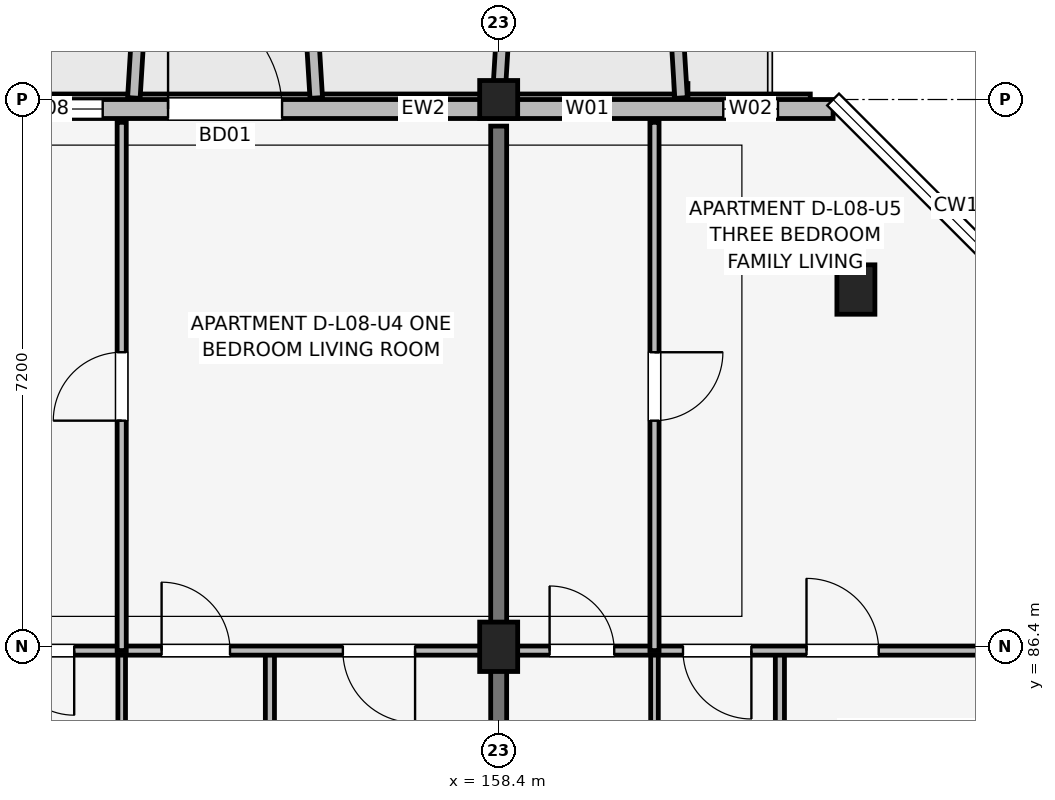
"""IFC4 building model, lengths in metres.
Left out: names, types, materials, properties, quantities, classifications, styles, units other than length and angle.
Written with IfcOpenShell. Run it as: python <this file> out.ifc"""

import sys

from ifc_helpers import new_model, si_unit, direction, frame, frame_2d, origin, origin_2d, place, context, subcontext, project, spatial, rectangle, extrude, element, fill, save


model = new_model("IFC4")
c1 = context("Model", 3, precision=1e-05, world=origin(), true_north=direction((0.0, 1.0)))
c2 = subcontext(c1, "Body", "Model", "MODEL_VIEW")
j1 = project(units=[si_unit("LENGTHUNIT", "METRE"), si_unit("PLANEANGLEUNIT", "RADIAN")], contexts=[c1])
p1 = place(None, origin())
s1 = spatial("IfcSite", under=j1, at=p1, CompositionType="ELEMENT")
p2 = place(p1, origin())
s2 = spatial("IfcBuilding", under=s1, at=p2, CompositionType="ELEMENT")
p3 = place(p2, frame((0.0, 0.0, 27.6)))
s3 = spatial("IfcBuildingStorey", under=s2, at=p3, CompositionType="ELEMENT", Elevation=27.6)
p4 = place(p3, frame((158.4, 86.4, 0.0), z_axis=(0.0, 0.0, 1.0), x_axis=(1.0, 0.0, 0.0)))
e1 = element("IfcColumn", 1, at=p4, inside=s3, PredefinedType="COLUMN", context=c2, shape_type="SweptSolid", body=[
    extrude(rectangle(XDim=0.5, YDim=0.65, at=origin_2d()), origin(), (0.0, 0.0, 1.0), 3.15),
])
p5 = place(p3, frame((158.4, 93.6, 0.0), z_axis=(0.0, 0.0, 1.0), x_axis=(1.0, 0.0, 0.0)))
e2 = element("IfcColumn", 2, at=p5, inside=s3, PredefinedType="COLUMN", context=c2, shape_type="SweptSolid", body=[
    extrude(rectangle(XDim=0.5, YDim=0.5, at=origin_2d()), origin(), (0.0, 0.0, 1.0), 3.15),
])
p6 = place(p3, frame((163.1, 91.1, 0.0), z_axis=(0.0, 0.0, 1.0), x_axis=(1.0, 0.0, 0.0)))
e3 = element("IfcColumn", 3, at=p6, inside=s3, PredefinedType="COLUMN", context=c2, shape_type="SweptSolid", body=[
    extrude(rectangle(XDim=0.5, YDim=0.65, at=origin_2d()), origin(), (0.0, 0.0, 1.0), 3.15),
])
p7 = place(p3, frame((158.4, 83.85, 0.0), z_axis=(0.0, 0.0, 1.0), x_axis=(0.0, 1.0, 0.0)))
e4 = element("IfcWall", 4, at=p7, inside=s3, PredefinedType="SHEAR", context=c2, shape_type="SweptSolid", body=[
    extrude(rectangle(XDim=9.4, YDim=0.21, at=frame_2d((4.7, 0.0))), origin(), (0.0, 0.0, 1.0), 3.15),
])
p8 = place(p3, frame((162.8, 93.475, 0.0), z_axis=(0.0, 0.0, 1.0), x_axis=(-1.0, 0.0, 0.0)))
e5 = element("IfcWall", 5, at=p8, inside=s3, PredefinedType="SOLIDWALL", context=c2, shape_type="SweptSolid", body=[
    extrude(rectangle(XDim=30.4, YDim=0.25, at=frame_2d((15.2, 0.0))), origin(), (0.0, 0.0, 1.0), 2.43),
])
p9 = place(p8, frame((23.225, 0.0, 0.0), z_axis=(0.0, 0.0, 1.0), x_axis=(-1.0, 0.0, 0.0)))
e6 = element("IfcOpeningElement", 6, at=p9, cuts=e5, PredefinedType="OPENING", context=c2, shape_type="SweptSolid", body=[
    extrude(rectangle(XDim=1.65, YDim=2.15, at=frame_2d((0.825, 1.075))), frame((0.0, 0.135, 0.0), z_axis=(0.0, -1.0, 0.0), x_axis=(1.0, 0.0, 0.0)), (0.0, 0.0, 1.0), 0.27),
])
p10 = place(p8, frame((8.75, 0.0, 0.0), z_axis=(0.0, 0.0, 1.0), x_axis=(-1.0, 0.0, 0.0)))
e7 = element("IfcOpeningElement", 7, at=p10, cuts=e5, PredefinedType="OPENING", context=c2, shape_type="SweptSolid", body=[
    extrude(rectangle(XDim=1.5, YDim=2.15, at=frame_2d((0.75, 1.075))), frame((0.0, 0.135, 0.0), z_axis=(0.0, -1.0, 0.0), x_axis=(1.0, 0.0, 0.0)), (0.0, 0.0, 1.0), 0.27),
])
p11 = place(p8, frame((26.545, 0.0, 0.75)))
e8 = element("IfcOpeningElement", 8, at=p11, cuts=e5, PredefinedType="OPENING", context=c2, shape_type="SweptSolid", body=[
    extrude(rectangle(XDim=0.98, YDim=1.45, at=frame_2d((0.49, 0.725))), frame((0.0, 0.135, 0.0), z_axis=(0.0, -1.0, 0.0), x_axis=(1.0, 0.0, 0.0)), (0.0, 0.0, 1.0), 0.27),
])
p12 = place(p8, frame((24.315, 0.0, 0.75)))
e9 = element("IfcOpeningElement", 9, at=p12, cuts=e5, PredefinedType="OPENING", context=c2, shape_type="SweptSolid", body=[
    extrude(rectangle(XDim=1.1, YDim=1.5, at=frame_2d((0.55, 0.75))), frame((0.0, 0.135, 0.0), z_axis=(0.0, -1.0, 0.0), x_axis=(1.0, 0.0, 0.0)), (0.0, 0.0, 1.0), 0.27),
])
p13 = place(p8, frame((16.525, 0.0, 0.7)))
e10 = element("IfcOpeningElement", 10, at=p13, cuts=e5, PredefinedType="OPENING", context=c2, shape_type="SweptSolid", body=[
    extrude(rectangle(XDim=1.86, YDim=1.6, at=frame_2d((0.93, 0.8))), frame((0.0, 0.135, 0.0), z_axis=(0.0, -1.0, 0.0), x_axis=(1.0, 0.0, 0.0)), (0.0, 0.0, 1.0), 0.27),
])
p14 = place(p8, frame((12.275, 0.0, 0.75)))
e11 = element("IfcOpeningElement", 11, at=p14, cuts=e5, PredefinedType="OPENING", context=c2, shape_type="SweptSolid", body=[
    extrude(rectangle(XDim=1.34, YDim=1.55, at=frame_2d((0.67, 0.775))), frame((0.0, 0.135, 0.0), z_axis=(0.0, -1.0, 0.0), x_axis=(1.0, 0.0, 0.0)), (0.0, 0.0, 1.0), 0.27),
])
p15 = place(p8, frame((9.61, 0.0, 0.75)))
e12 = element("IfcOpeningElement", 12, at=p15, cuts=e5, PredefinedType="OPENING", context=c2, shape_type="SweptSolid", body=[
    extrude(rectangle(XDim=1.46, YDim=1.55, at=frame_2d((0.73, 0.775))), frame((0.0, 0.135, 0.0), z_axis=(0.0, -1.0, 0.0), x_axis=(1.0, 0.0, 0.0)), (0.0, 0.0, 1.0), 0.27),
])
p16 = place(p8, frame((2.935, 0.0, 0.75)))
e13 = element("IfcOpeningElement", 13, at=p16, cuts=e5, PredefinedType="OPENING", context=c2, shape_type="SweptSolid", body=[
    extrude(rectangle(XDim=0.6, YDim=1.25, at=frame_2d((0.3, 0.625))), frame((0.0, 0.135, 0.0), z_axis=(0.0, -1.0, 0.0), x_axis=(1.0, 0.0, 0.0)), (0.0, 0.0, 1.0), 0.27),
])
p17 = place(p8, frame((0.725, 0.0, 0.75)))
e14 = element("IfcOpeningElement", 14, at=p17, cuts=e5, PredefinedType="OPENING", context=c2, shape_type="SweptSolid", body=[
    extrude(rectangle(XDim=0.72, YDim=1.35, at=frame_2d((0.36, 0.675))), frame((0.0, 0.135, 0.0), z_axis=(0.0, -1.0, 0.0), x_axis=(1.0, 0.0, 0.0)), (0.0, 0.0, 1.0), 0.27),
])
for number, where, z_axis, x_axis in (
    (15, (153.6, 93.62, 0.0), (0.0, 0.0, 1.0), (0.061, 0.998, 0.0)),
    (16, (156.0, 93.62, 0.0), (0.0, 0.0, 1.0), (-0.061, 0.998, 0.0)),
):
    element("IfcWall", number, at=place(p3, frame(where, z_axis=z_axis, x_axis=x_axis)), inside=s3, PredefinedType="ELEMENTEDWALL", context=c2, shape_type="SweptSolid", body=[
        extrude(rectangle(XDim=1.964, YDim=0.165, at=frame_2d((0.982, 0.0))), origin(), (0.0, 0.0, 1.0), 2.55),
    ])
for number, where, z_axis, x_axis in (
    (17, (158.4, 93.62, 0.0), (0.0, 0.0, 1.0), (0.061, 0.998, 0.0)),
    (18, (160.8, 93.62, 0.0), (0.0, 0.0, 1.0), (-0.061, 0.998, 0.0)),
):
    element("IfcWall", number, at=place(p3, frame(where, z_axis=z_axis, x_axis=x_axis)), inside=s3, PredefinedType="ELEMENTEDWALL", context=c2, shape_type="SweptSolid", body=[
        extrude(rectangle(XDim=1.964, YDim=0.165, at=frame_2d((0.982, 0.0))), origin(), (0.0, 0.0, 1.0), 2.95),
    ])
p18 = place(p3, frame((153.44, 83.7, 0.0), z_axis=(0.0, 0.0, 1.0), x_axis=(0.0, 1.0, 0.0)))
e19 = element("IfcWall", 19, at=p18, inside=s3, PredefinedType="PARTITIONING", context=c2, shape_type="SweptSolid", body=[
    extrude(rectangle(XDim=2.65, YDim=0.1, at=frame_2d((1.325, 0.0))), origin(), (0.0, 0.0, 1.0), 2.38),
])
p19 = place(p3, frame((155.39, 83.7, 0.0), z_axis=(0.0, 0.0, 1.0), x_axis=(0.0, 1.0, 0.0)))
e20 = element("IfcWall", 20, at=p19, inside=s3, PredefinedType="PARTITIONING", context=c2, shape_type="SweptSolid", body=[
    extrude(rectangle(XDim=2.65, YDim=0.12, at=frame_2d((1.325, 0.0))), origin(), (0.0, 0.0, 1.0), 2.38),
])
p20 = place(p3, frame((151.34, 86.35, 0.0), z_axis=(0.0, 0.0, 1.0), x_axis=(1.0, 0.0, 0.0)))
e21 = element("IfcWall", 21, at=p20, inside=s3, PredefinedType="PARTITIONING", context=c2, shape_type="SweptSolid", body=[
    extrude(rectangle(XDim=6.92, YDim=0.12, at=frame_2d((3.46, 0.0))), origin(), (0.0, 0.0, 1.0), 2.38),
])
p21 = place(p20, frame((1.475, 0.0, 0.0), z_axis=(0.0, 0.0, 1.0), x_axis=(-1.0, 0.0, 0.0)))
e22 = element("IfcOpeningElement", 22, at=p21, cuts=e21, PredefinedType="OPENING", context=c2, shape_type="SweptSolid", body=[
    extrude(rectangle(XDim=0.85, YDim=2.08, at=frame_2d((0.425, 1.04))), frame((0.0, 0.07, 0.0), z_axis=(0.0, -1.0, 0.0), x_axis=(1.0, 0.0, 0.0)), (0.0, 0.0, 1.0), 0.14),
])
p22 = place(p20, frame((2.625, 0.0, 0.0)))
e23 = element("IfcOpeningElement", 23, at=p22, cuts=e21, PredefinedType="OPENING", context=c2, shape_type="SweptSolid", body=[
    extrude(rectangle(XDim=0.9, YDim=2.08, at=frame_2d((0.45, 1.04))), frame((0.0, 0.07, 0.0), z_axis=(0.0, -1.0, 0.0), x_axis=(1.0, 0.0, 0.0)), (0.0, 0.0, 1.0), 0.14),
])
p23 = place(p20, frame((5.96, 0.0, 0.0), z_axis=(0.0, 0.0, 1.0), x_axis=(-1.0, 0.0, 0.0)))
e24 = element("IfcOpeningElement", 24, at=p23, cuts=e21, PredefinedType="OPENING", context=c2, shape_type="SweptSolid", body=[
    extrude(rectangle(XDim=0.95, YDim=2.08, at=frame_2d((0.475, 1.04))), frame((0.0, 0.07, 0.0), z_axis=(0.0, -1.0, 0.0), x_axis=(1.0, 0.0, 0.0)), (0.0, 0.0, 1.0), 0.14),
])
p24 = place(p3, frame((153.44, 86.35, 0.0), z_axis=(0.0, 0.0, 1.0), x_axis=(0.0, 1.0, 0.0)))
e25 = element("IfcWall", 25, at=p24, inside=s3, PredefinedType="PARTITIONING", context=c2, shape_type="SweptSolid", body=[
    extrude(rectangle(XDim=6.95, YDim=0.12, at=frame_2d((3.475, 0.0))), origin(), (0.0, 0.0, 1.0), 2.38),
])
p25 = place(p24, frame((3.025, 0.0, 0.0)))
e26 = element("IfcOpeningElement", 26, at=p25, cuts=e25, PredefinedType="OPENING", context=c2, shape_type="SweptSolid", body=[
    extrude(rectangle(XDim=0.9, YDim=2.08, at=frame_2d((0.45, 1.04))), frame((0.0, 0.07, 0.0), z_axis=(0.0, -1.0, 0.0), x_axis=(1.0, 0.0, 0.0)), (0.0, 0.0, 1.0), 0.14),
])
p26 = place(p3, frame((160.45, 83.7, 0.0), z_axis=(0.0, 0.0, 1.0), x_axis=(0.0, 1.0, 0.0)))
e27 = element("IfcWall", 27, at=p26, inside=s3, PredefinedType="PARTITIONING", context=c2, shape_type="SweptSolid", body=[
    extrude(rectangle(XDim=2.65, YDim=0.1, at=frame_2d((1.325, 0.0))), origin(), (0.0, 0.0, 1.0), 2.38),
])
p27 = place(p3, frame((162.1, 83.7, 0.0), z_axis=(0.0, 0.0, 1.0), x_axis=(0.0, 1.0, 0.0)))
e28 = element("IfcWall", 28, at=p27, inside=s3, PredefinedType="PARTITIONING", context=c2, shape_type="SweptSolid", body=[
    extrude(rectangle(XDim=2.65, YDim=0.12, at=frame_2d((1.325, 0.0))), origin(), (0.0, 0.0, 1.0), 2.38),
])
p28 = place(p3, frame((158.54, 86.35, 0.0), z_axis=(0.0, 0.0, 1.0), x_axis=(1.0, 0.0, 0.0)))
e29 = element("IfcWall", 29, at=p28, inside=s3, PredefinedType="PARTITIONING", context=c2, shape_type="SweptSolid", body=[
    extrude(rectangle(XDim=6.92, YDim=0.12, at=frame_2d((3.46, 0.0))), origin(), (0.0, 0.0, 1.0), 2.38),
])
p29 = place(p28, frame((0.53, 0.0, 0.0)))
e30 = element("IfcOpeningElement", 30, at=p29, cuts=e29, PredefinedType="OPENING", context=c2, shape_type="SweptSolid", body=[
    extrude(rectangle(XDim=0.85, YDim=2.08, at=frame_2d((0.425, 1.04))), frame((0.0, 0.07, 0.0), z_axis=(0.0, -1.0, 0.0), x_axis=(1.0, 0.0, 0.0)), (0.0, 0.0, 1.0), 0.14),
])
p30 = place(p28, frame((3.185, 0.0, 0.0), z_axis=(0.0, 0.0, 1.0), x_axis=(-1.0, 0.0, 0.0)))
e31 = element("IfcOpeningElement", 31, at=p30, cuts=e29, PredefinedType="OPENING", context=c2, shape_type="SweptSolid", body=[
    extrude(rectangle(XDim=0.9, YDim=2.08, at=frame_2d((0.45, 1.04))), frame((0.0, 0.07, 0.0), z_axis=(0.0, -1.0, 0.0), x_axis=(1.0, 0.0, 0.0)), (0.0, 0.0, 1.0), 0.14),
])
p31 = place(p28, frame((3.91, 0.0, 0.0)))
e32 = element("IfcOpeningElement", 32, at=p31, cuts=e29, PredefinedType="OPENING", context=c2, shape_type="SweptSolid", body=[
    extrude(rectangle(XDim=0.95, YDim=2.08, at=frame_2d((0.475, 1.04))), frame((0.0, 0.07, 0.0), z_axis=(0.0, -1.0, 0.0), x_axis=(1.0, 0.0, 0.0)), (0.0, 0.0, 1.0), 0.14),
])
p32 = place(p3, frame((160.45, 86.35, 0.0), z_axis=(0.0, 0.0, 1.0), x_axis=(0.0, 1.0, 0.0)))
e33 = element("IfcWall", 33, at=p32, inside=s3, PredefinedType="PARTITIONING", context=c2, shape_type="SweptSolid", body=[
    extrude(rectangle(XDim=6.95, YDim=0.12, at=frame_2d((3.475, 0.0))), origin(), (0.0, 0.0, 1.0), 2.38),
])
p33 = place(p32, frame((3.925, 0.0, 0.0), z_axis=(0.0, 0.0, 1.0), x_axis=(-1.0, 0.0, 0.0)))
e34 = element("IfcOpeningElement", 34, at=p33, cuts=e33, PredefinedType="OPENING", context=c2, shape_type="SweptSolid", body=[
    extrude(rectangle(XDim=0.9, YDim=2.08, at=frame_2d((0.45, 1.04))), frame((0.0, 0.07, 0.0), z_axis=(0.0, -1.0, 0.0), x_axis=(1.0, 0.0, 0.0)), (0.0, 0.0, 1.0), 0.14),
])
p34 = place(p10, origin())
e35 = element("IfcDoor", 35, at=p34, inside=s3, OperationType="SINGLE_SWING_RIGHT", PredefinedType="DOOR", context=c2, shape_type="SweptSolid", body=[
    extrude(rectangle(XDim=1.5, YDim=2.15, at=frame_2d((0.75, 1.075))), frame((0.0, 0.025, 0.0), z_axis=(0.0, -1.0, 0.0), x_axis=(1.0, 0.0, 0.0)), (0.0, 0.0, 1.0), 0.05),
])
fill(e7, e35)
p35 = place(p15, origin())
e36 = element("IfcWindow", 36, at=p35, inside=s3, PartitioningType="SINGLE_PANEL", PredefinedType="WINDOW", context=c2, shape_type="SweptSolid", body=[
    extrude(rectangle(XDim=1.46, YDim=1.55, at=frame_2d((0.73, 0.775))), frame((0.0, 0.03, 0.0), z_axis=(0.0, -1.0, 0.0), x_axis=(1.0, 0.0, 0.0)), (0.0, 0.0, 1.0), 0.06),
])
fill(e12, e36)
p36 = place(p16, origin())
e37 = element("IfcWindow", 37, at=p36, inside=s3, PartitioningType="SINGLE_PANEL", PredefinedType="WINDOW", context=c2, shape_type="SweptSolid", body=[
    extrude(rectangle(XDim=0.6, YDim=1.25, at=frame_2d((0.3, 0.625))), frame((0.0, 0.03, 0.0), z_axis=(0.0, -1.0, 0.0), x_axis=(1.0, 0.0, 0.0)), (0.0, 0.0, 1.0), 0.06),
])
fill(e13, e37)
p37 = place(p17, origin())
e38 = element("IfcWindow", 38, at=p37, inside=s3, PartitioningType="SINGLE_PANEL", PredefinedType="WINDOW", context=c2, shape_type="SweptSolid", body=[
    extrude(rectangle(XDim=0.72, YDim=1.35, at=frame_2d((0.36, 0.675))), frame((0.0, 0.03, 0.0), z_axis=(0.0, -1.0, 0.0), x_axis=(1.0, 0.0, 0.0)), (0.0, 0.0, 1.0), 0.06),
])
fill(e14, e38)
p38 = place(p21, origin())
e39 = element("IfcDoor", 39, at=p38, inside=s3, OperationType="SINGLE_SWING_RIGHT", PredefinedType="DOOR", context=c2, shape_type="SweptSolid", body=[
    extrude(rectangle(XDim=0.85, YDim=2.08, at=frame_2d((0.425, 1.04))), frame((0.0, 0.025, 0.0), z_axis=(0.0, -1.0, 0.0), x_axis=(1.0, 0.0, 0.0)), (0.0, 0.0, 1.0), 0.05),
])
fill(e22, e39)
p39 = place(p22, origin())
e40 = element("IfcDoor", 40, at=p39, inside=s3, OperationType="SINGLE_SWING_LEFT", PredefinedType="DOOR", context=c2, shape_type="SweptSolid", body=[
    extrude(rectangle(XDim=0.9, YDim=2.08, at=frame_2d((0.45, 1.04))), frame((0.0, 0.025, 0.0), z_axis=(0.0, -1.0, 0.0), x_axis=(1.0, 0.0, 0.0)), (0.0, 0.0, 1.0), 0.05),
])
fill(e23, e40)
p40 = place(p23, origin())
e41 = element("IfcDoor", 41, at=p40, inside=s3, OperationType="SINGLE_SWING_RIGHT", PredefinedType="DOOR", context=c2, shape_type="SweptSolid", body=[
    extrude(rectangle(XDim=0.95, YDim=2.08, at=frame_2d((0.475, 1.04))), frame((0.0, 0.025, 0.0), z_axis=(0.0, -1.0, 0.0), x_axis=(1.0, 0.0, 0.0)), (0.0, 0.0, 1.0), 0.05),
])
fill(e24, e41)
p41 = place(p25, origin())
e42 = element("IfcDoor", 42, at=p41, inside=s3, OperationType="SINGLE_SWING_LEFT", PredefinedType="DOOR", context=c2, shape_type="SweptSolid", body=[
    extrude(rectangle(XDim=0.9, YDim=2.08, at=frame_2d((0.45, 1.04))), frame((0.0, 0.025, 0.0), z_axis=(0.0, -1.0, 0.0), x_axis=(1.0, 0.0, 0.0)), (0.0, 0.0, 1.0), 0.05),
])
fill(e26, e42)
p42 = place(p29, origin())
e43 = element("IfcDoor", 43, at=p42, inside=s3, OperationType="SINGLE_SWING_LEFT", PredefinedType="DOOR", context=c2, shape_type="SweptSolid", body=[
    extrude(rectangle(XDim=0.85, YDim=2.08, at=frame_2d((0.425, 1.04))), frame((0.0, 0.025, 0.0), z_axis=(0.0, -1.0, 0.0), x_axis=(1.0, 0.0, 0.0)), (0.0, 0.0, 1.0), 0.05),
])
fill(e30, e43)
p43 = place(p30, origin())
e44 = element("IfcDoor", 44, at=p43, inside=s3, OperationType="SINGLE_SWING_RIGHT", PredefinedType="DOOR", context=c2, shape_type="SweptSolid", body=[
    extrude(rectangle(XDim=0.9, YDim=2.08, at=frame_2d((0.45, 1.04))), frame((0.0, 0.025, 0.0), z_axis=(0.0, -1.0, 0.0), x_axis=(1.0, 0.0, 0.0)), (0.0, 0.0, 1.0), 0.05),
])
fill(e31, e44)
p44 = place(p31, origin())
e45 = element("IfcDoor", 45, at=p44, inside=s3, OperationType="SINGLE_SWING_LEFT", PredefinedType="DOOR", context=c2, shape_type="SweptSolid", body=[
    extrude(rectangle(XDim=0.95, YDim=2.08, at=frame_2d((0.475, 1.04))), frame((0.0, 0.025, 0.0), z_axis=(0.0, -1.0, 0.0), x_axis=(1.0, 0.0, 0.0)), (0.0, 0.0, 1.0), 0.05),
])
fill(e32, e45)
p45 = place(p33, origin())
e46 = element("IfcDoor", 46, at=p45, inside=s3, OperationType="SINGLE_SWING_RIGHT", PredefinedType="DOOR", context=c2, shape_type="SweptSolid", body=[
    extrude(rectangle(XDim=0.9, YDim=2.08, at=frame_2d((0.45, 1.04))), frame((0.0, 0.025, 0.0), z_axis=(0.0, -1.0, 0.0), x_axis=(1.0, 0.0, 0.0)), (0.0, 0.0, 1.0), 0.05),
])
fill(e34, e46)
save(model, sys.argv[1])
